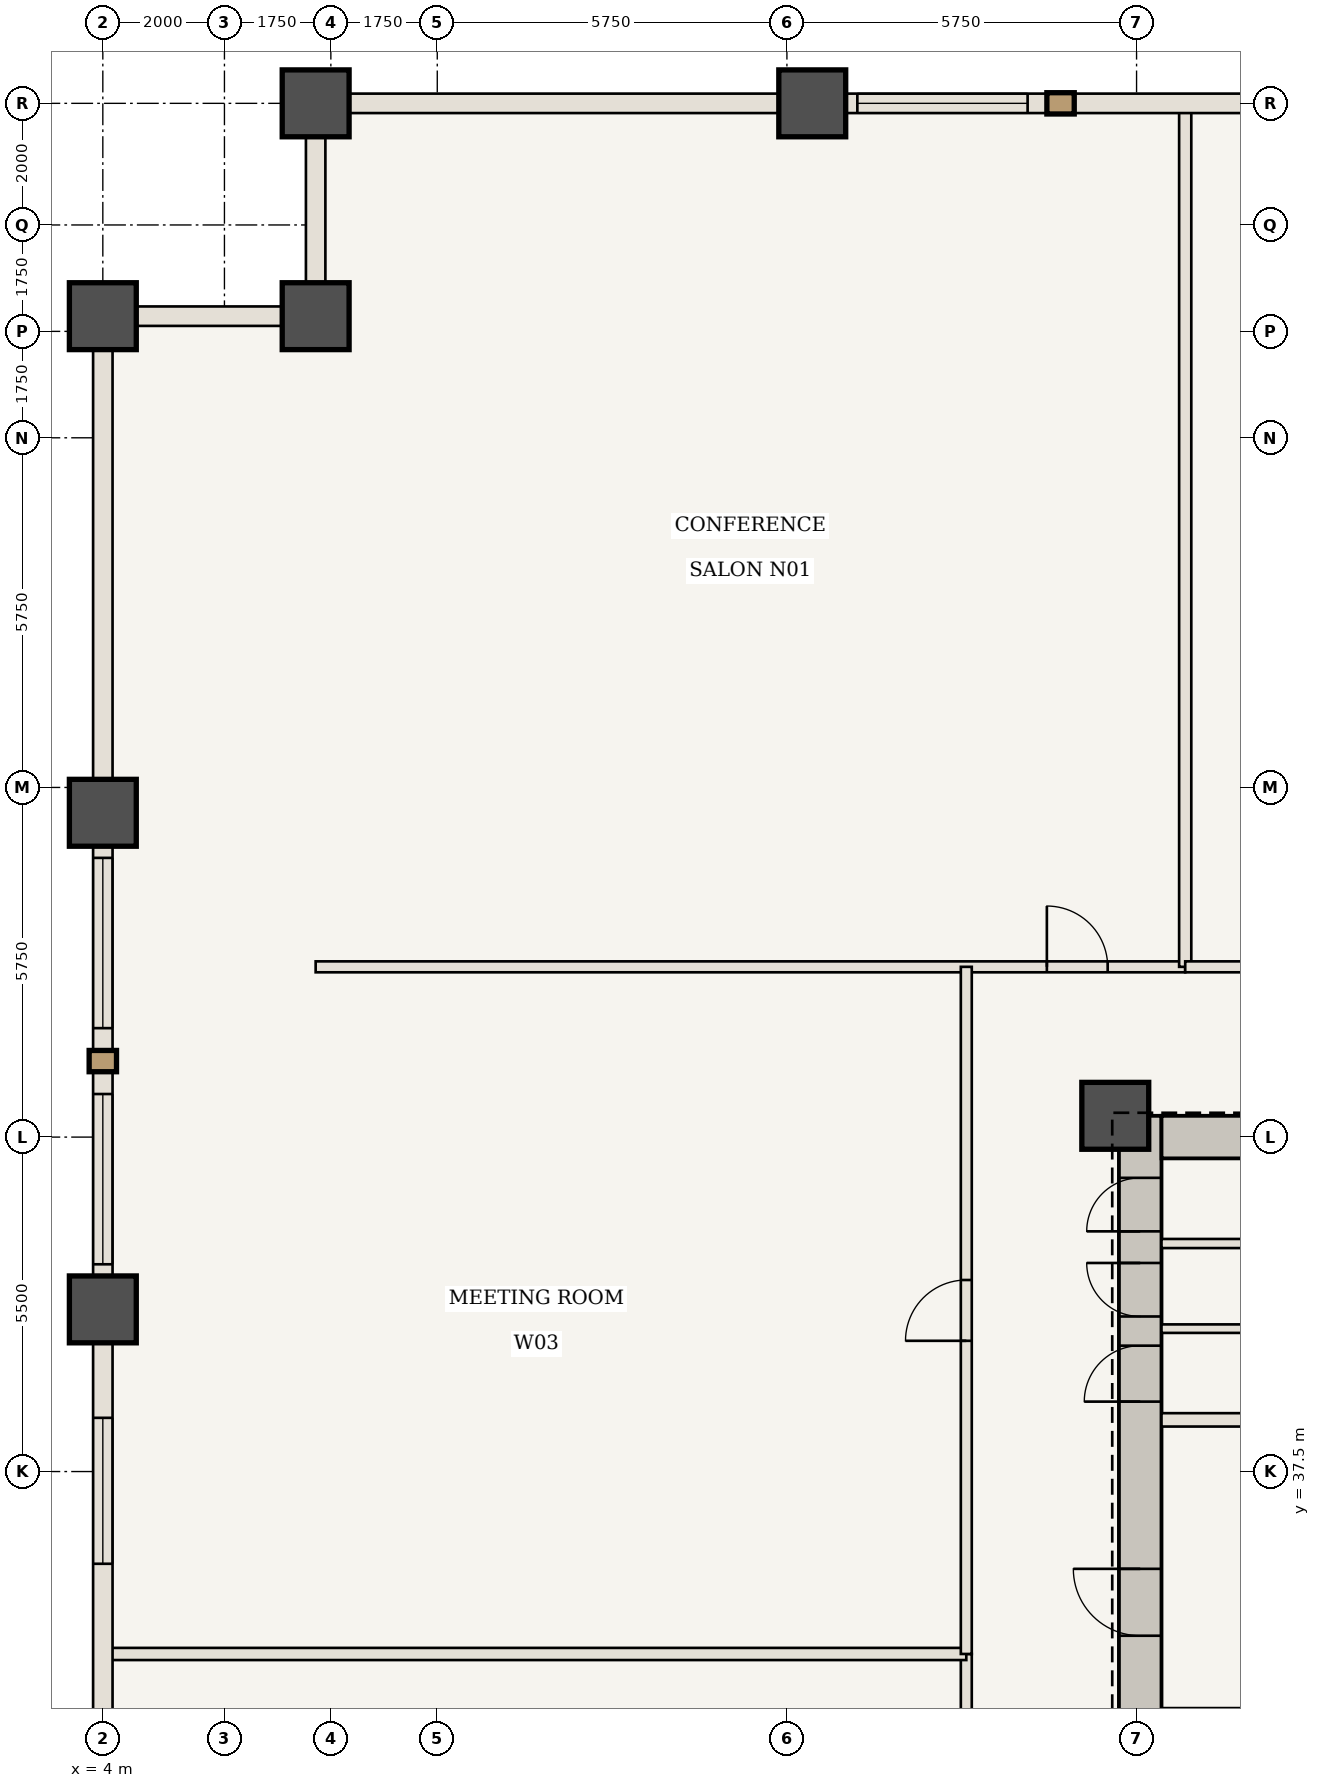
"""IFC4 building model, lengths in metres.
Left out: names, types, materials, properties, quantities, classifications, styles, units other than length and angle.
Written with IfcOpenShell. Run it as: python <this file> out.ifc"""

import sys

from ifc_helpers import new_model, si_unit, direction, frame, frame_2d, origin, origin_2d, place, context, subcontext, project, spatial, rectangle, extrude, element, fill, save


model = new_model("IFC4")
c1 = context("Model", 3, precision=1e-05, world=origin(), true_north=direction((0.0, 1.0)))
c2 = subcontext(c1, "Body", "Model", "MODEL_VIEW")
j1 = project(units=[si_unit("LENGTHUNIT", "METRE"), si_unit("PLANEANGLEUNIT", "RADIAN")], contexts=[c1])
p1 = place(None, origin())
s1 = spatial("IfcSite", under=j1, at=p1, CompositionType="ELEMENT")
p2 = place(p1, origin())
s2 = spatial("IfcBuilding", under=s1, at=p2, CompositionType="ELEMENT")
p3 = place(p2, frame((0.0, 0.0, 89.25)))
s3 = spatial("IfcBuildingStorey", under=s2, at=p3, CompositionType="ELEMENT", Elevation=89.25)
p4 = place(p3, frame((21.06, 30.6, 0.0), z_axis=(0.0, 0.0, 1.0), x_axis=(0.0, 1.0, 0.0)))
e1 = element("IfcWall", 1, at=p4, inside=s3, PredefinedType="SHEAR", context=c2, shape_type="SweptSolid", body=[
    extrude(rectangle(XDim=12.75, YDim=0.7, at=frame_2d((6.375, 0.0))), origin(), (0.0, 0.0, 1.0), 3.5),
])
p5 = place(p4, frame((4.2, 0.0, 0.0)))
e2 = element("IfcOpeningElement", 2, at=p5, cuts=e1, PredefinedType="OPENING", context=c2, shape_type="SweptSolid", body=[
    extrude(rectangle(XDim=1.1, YDim=2.15, at=frame_2d((0.55, 1.075))), frame((0.0, 0.36, 0.0), z_axis=(0.0, -1.0, 0.0), x_axis=(1.0, 0.0, 0.0)), (0.0, 0.0, 1.0), 0.72),
])
p6 = place(p4, frame((8.05, 0.0, 0.0)))
e3 = element("IfcOpeningElement", 3, at=p6, cuts=e1, PredefinedType="OPENING", context=c2, shape_type="SweptSolid", body=[
    extrude(rectangle(XDim=0.92, YDim=2.1, at=frame_2d((0.46, 1.05))), frame((0.0, 0.36, 0.0), z_axis=(0.0, -1.0, 0.0), x_axis=(1.0, 0.0, 0.0)), (0.0, 0.0, 1.0), 0.72),
])
p7 = place(p4, frame((9.45, 0.0, 0.0)))
e4 = element("IfcOpeningElement", 4, at=p7, cuts=e1, PredefinedType="OPENING", context=c2, shape_type="SweptSolid", body=[
    extrude(rectangle(XDim=0.88, YDim=2.1, at=frame_2d((0.44, 1.05))), frame((0.0, 0.36, 0.0), z_axis=(0.0, -1.0, 0.0), x_axis=(1.0, 0.0, 0.0)), (0.0, 0.0, 1.0), 0.72),
])
p8 = place(p4, frame((10.85, 0.0, 0.0)))
e5 = element("IfcOpeningElement", 5, at=p8, cuts=e1, PredefinedType="OPENING", context=c2, shape_type="SweptSolid", body=[
    extrude(rectangle(XDim=0.88, YDim=2.1, at=frame_2d((0.44, 1.05))), frame((0.0, 0.36, 0.0), z_axis=(0.0, -1.0, 0.0), x_axis=(1.0, 0.0, 0.0)), (0.0, 0.0, 1.0), 0.72),
])
p9 = place(p3, frame((21.41, 43.0, 0.0), z_axis=(0.0, 0.0, 1.0), x_axis=(1.0, 0.0, 0.0)))
e6 = element("IfcWall", 6, at=p9, inside=s3, PredefinedType="SHEAR", context=c2, shape_type="SweptSolid", body=[
    extrude(rectangle(XDim=8.24, YDim=0.7, at=frame_2d((4.12, 0.0))), origin(), (0.0, 0.0, 1.0), 3.5),
])
for number, where, z_axis, x_axis in (
    (7, (20.65, 43.35, 0.0), (0.0, 0.0, 1.0), (1.0, 0.0, 0.0)),
    (8, (7.5, 60.0, 0.0), (0.0, 0.0, 1.0), (1.0, 0.0, 0.0)),
    (9, (7.5, 56.5, 0.0), (0.0, 0.0, 1.0), (1.0, 0.0, 0.0)),
    (10, (4.0, 56.5, 0.0), (0.0, 0.0, 1.0), (1.0, 0.0, 0.0)),
    (11, (15.667, 60.0, 0.0), (0.0, 0.0, 1.0), (1.0, 0.0, 0.0)),
    (12, (4.0, 40.167, 0.0), (0.0, 0.0, 1.0), (1.0, 0.0, 0.0)),
    (13, (4.0, 48.333, 0.0), (0.0, 0.0, 1.0), (1.0, 0.0, 0.0)),
):
    element("IfcColumn", number, at=place(p3, frame(where, z_axis=z_axis, x_axis=x_axis)), inside=s3, PredefinedType="COLUMN", context=c2, shape_type="SweptSolid", body=[
        extrude(rectangle(XDim=1.1, YDim=1.1, at=origin_2d()), origin(), (0.0, 0.0, 1.0), 3.5),
    ])
p10 = place(p3, frame((21.41, 33.5, 0.0), z_axis=(0.0, 0.0, 1.0), x_axis=(1.0, 0.0, 0.0)))
e14 = element("IfcWall", 14, at=p10, inside=s3, PredefinedType="STANDARD", context=c2, shape_type="SweptSolid", body=[
    extrude(rectangle(XDim=3.53, YDim=0.22, at=frame_2d((1.765, 0.0))), origin(), (0.0, 0.0, 1.0), 3.32),
])
p11 = place(p10, frame((0.75, 0.0, 0.0)))
e15 = element("IfcOpeningElement", 15, at=p11, cuts=e14, PredefinedType="OPENING", context=c2, shape_type="SweptSolid", body=[
    extrude(rectangle(XDim=1.2, YDim=2.2, at=frame_2d((0.6, 1.1))), frame((0.0, 0.12, 0.0), z_axis=(0.0, -1.0, 0.0), x_axis=(1.0, 0.0, 0.0)), (0.0, 0.0, 1.0), 0.24),
])
p12 = place(p3, frame((21.41, 38.35, 0.0), z_axis=(0.0, 0.0, 1.0), x_axis=(1.0, 0.0, 0.0)))
e16 = element("IfcWall", 16, at=p12, inside=s3, PredefinedType="STANDARD", context=c2, shape_type="SweptSolid", body=[
    extrude(rectangle(XDim=3.53, YDim=0.22, at=frame_2d((1.765, 0.0))), origin(), (0.0, 0.0, 1.0), 3.32),
])
p13 = place(p3, frame((21.41, 39.85, 0.0), z_axis=(0.0, 0.0, 1.0), x_axis=(1.0, 0.0, 0.0)))
e17 = element("IfcWall", 17, at=p13, inside=s3, PredefinedType="STANDARD", context=c2, shape_type="SweptSolid", body=[
    extrude(rectangle(XDim=3.53, YDim=0.14, at=frame_2d((1.765, 0.0))), origin(), (0.0, 0.0, 1.0), 3.32),
])
p14 = place(p3, frame((21.41, 41.25, 0.0), z_axis=(0.0, 0.0, 1.0), x_axis=(1.0, 0.0, 0.0)))
e18 = element("IfcWall", 18, at=p14, inside=s3, PredefinedType="STANDARD", context=c2, shape_type="SweptSolid", body=[
    extrude(rectangle(XDim=3.53, YDim=0.15, at=frame_2d((1.765, 0.0))), origin(), (0.0, 0.0, 1.0), 3.32),
])
p15 = place(p3, frame((7.5, 45.8, 0.0), z_axis=(0.0, 0.0, 1.0), x_axis=(1.0, 0.0, 0.0)))
e19 = element("IfcWall", 19, at=p15, inside=s3, PredefinedType="STANDARD", context=c2, shape_type="SweptSolid", body=[
    extrude(rectangle(XDim=14.3, YDim=0.18, at=frame_2d((7.15, 0.0))), origin(), (0.0, 0.0, 1.0), 3.32),
])
p16 = place(p15, frame((12.025, 0.0, 0.0)))
e20 = element("IfcOpeningElement", 20, at=p16, cuts=e19, PredefinedType="OPENING", context=c2, shape_type="SweptSolid", body=[
    extrude(rectangle(XDim=1.0, YDim=2.15, at=frame_2d((0.5, 1.075))), frame((0.0, 0.1, 0.0), z_axis=(0.0, -1.0, 0.0), x_axis=(1.0, 0.0, 0.0)), (0.0, 0.0, 1.0), 0.2),
])
p17 = place(p3, frame((21.8, 45.8, 0.0), z_axis=(0.0, 0.0, 1.0), x_axis=(0.0, 1.0, 0.0)))
e21 = element("IfcWall", 21, at=p17, inside=s3, PredefinedType="STANDARD", context=c2, shape_type="SweptSolid", body=[
    extrude(rectangle(XDim=14.14, YDim=0.2, at=frame_2d((7.07, 0.0))), origin(), (0.0, 0.0, 1.0), 3.32),
])
p18 = place(p3, frame((21.8, 45.8, 0.0), z_axis=(0.0, 0.0, 1.0), x_axis=(1.0, 0.0, 0.0)))
e22 = element("IfcWall", 22, at=p18, inside=s3, PredefinedType="STANDARD", context=c2, shape_type="SweptSolid", body=[
    extrude(rectangle(XDim=16.7, YDim=0.18, at=frame_2d((8.35, 0.0))), origin(), (0.0, 0.0, 1.0), 3.32),
])
p19 = place(p18, frame((9.3, 0.0, 0.0)))
e23 = element("IfcOpeningElement", 23, at=p19, cuts=e22, PredefinedType="OPENING", context=c2, shape_type="SweptSolid", body=[
    extrude(rectangle(XDim=1.0, YDim=2.15, at=frame_2d((0.5, 1.075))), frame((0.0, 0.1, 0.0), z_axis=(0.0, -1.0, 0.0), x_axis=(1.0, 0.0, 0.0)), (0.0, 0.0, 1.0), 0.2),
])
p20 = place(p3, frame((18.2, 23.8, 0.0), z_axis=(0.0, 0.0, 1.0), x_axis=(0.0, 1.0, 0.0)))
e24 = element("IfcWall", 24, at=p20, inside=s3, PredefinedType="STANDARD", context=c2, shape_type="SweptSolid", body=[
    extrude(rectangle(XDim=10.7, YDim=0.18, at=frame_2d((5.35, 0.0))), origin(), (0.0, 0.0, 1.0), 3.32),
])
p21 = place(p20, frame((4.85, 0.0, 0.0)))
e25 = element("IfcOpeningElement", 25, at=p21, cuts=e24, PredefinedType="OPENING", context=c2, shape_type="SweptSolid", body=[
    extrude(rectangle(XDim=1.0, YDim=2.15, at=frame_2d((0.5, 1.075))), frame((0.0, 0.1, 0.0), z_axis=(0.0, -1.0, 0.0), x_axis=(1.0, 0.0, 0.0)), (0.0, 0.0, 1.0), 0.2),
])
p22 = place(p3, frame((4.06, 34.5, 0.0), z_axis=(0.0, 0.0, 1.0), x_axis=(1.0, 0.0, 0.0)))
e26 = element("IfcWall", 26, at=p22, inside=s3, PredefinedType="STANDARD", context=c2, shape_type="SweptSolid", body=[
    extrude(rectangle(XDim=14.14, YDim=0.2, at=frame_2d((7.07, 0.0))), origin(), (0.0, 0.0, 1.0), 3.32),
])
p23 = place(p3, frame((18.2, 34.5, 0.0), z_axis=(0.0, 0.0, 1.0), x_axis=(0.0, 1.0, 0.0)))
e27 = element("IfcWall", 27, at=p23, inside=s3, PredefinedType="STANDARD", context=c2, shape_type="SweptSolid", body=[
    extrude(rectangle(XDim=11.3, YDim=0.18, at=frame_2d((5.65, 0.0))), origin(), (0.0, 0.0, 1.0), 3.32),
])
p24 = place(p23, frame((5.15, 0.0, 0.0)))
e28 = element("IfcOpeningElement", 28, at=p24, cuts=e27, PredefinedType="OPENING", context=c2, shape_type="SweptSolid", body=[
    extrude(rectangle(XDim=1.0, YDim=2.15, at=frame_2d((0.5, 1.075))), frame((0.0, 0.1, 0.0), z_axis=(0.0, -1.0, 0.0), x_axis=(1.0, 0.0, 0.0)), (0.0, 0.0, 1.0), 0.2),
])
p25 = place(p3, frame((7.5, 60.0, 0.0), z_axis=(0.0, 0.0, 1.0), x_axis=(1.0, 0.0, 0.0)))
e29 = element("IfcWall", 29, at=p25, inside=s3, PredefinedType="USERDEFINED", context=c2, shape_type="SweptSolid", body=[
    extrude(rectangle(XDim=8.167, YDim=0.32, at=frame_2d((4.083, 0.0))), origin(), (0.0, 0.0, 1.0), 2.52),
])
p26 = place(p3, frame((15.667, 60.0, 0.0), z_axis=(0.0, 0.0, 1.0), x_axis=(1.0, 0.0, 0.0)))
e30 = element("IfcWall", 30, at=p26, inside=s3, PredefinedType="USERDEFINED", context=c2, shape_type="SweptSolid", body=[
    extrude(rectangle(XDim=8.167, YDim=0.32, at=frame_2d((4.083, 0.0))), origin(), (0.0, 0.0, 1.0), 2.52),
])
p27 = place(p26, frame((0.742, 0.0, 0.85)))
e31 = element("IfcOpeningElement", 31, at=p27, cuts=e30, PredefinedType="OPENING", context=c2, shape_type="SweptSolid", body=[
    extrude(rectangle(XDim=2.8, YDim=1.47, at=frame_2d((1.4, 0.735))), frame((0.0, 0.17, 0.0), z_axis=(0.0, -1.0, 0.0), x_axis=(1.0, 0.0, 0.0)), (0.0, 0.0, 1.0), 0.34),
])
p28 = place(p3, frame((4.0, 32.0, 0.0), z_axis=(0.0, 0.0, 1.0), x_axis=(0.0, 1.0, 0.0)))
e32 = element("IfcWall", 32, at=p28, inside=s3, PredefinedType="USERDEFINED", context=c2, shape_type="SweptSolid", body=[
    extrude(rectangle(XDim=8.167, YDim=0.32, at=frame_2d((4.083, 0.0))), origin(), (0.0, 0.0, 1.0), 2.52),
])
p29 = place(p28, frame((3.983, 0.0, 0.85)))
e33 = element("IfcOpeningElement", 33, at=p29, cuts=e32, PredefinedType="OPENING", context=c2, shape_type="SweptSolid", body=[
    extrude(rectangle(XDim=2.4, YDim=1.47, at=frame_2d((1.2, 0.735))), frame((0.0, 0.17, 0.0), z_axis=(0.0, -1.0, 0.0), x_axis=(1.0, 0.0, 0.0)), (0.0, 0.0, 1.0), 0.34),
])
p30 = place(p3, frame((4.0, 40.167, 0.0), z_axis=(0.0, 0.0, 1.0), x_axis=(0.0, 1.0, 0.0)))
e34 = element("IfcWall", 34, at=p30, inside=s3, PredefinedType="USERDEFINED", context=c2, shape_type="SweptSolid", body=[
    extrude(rectangle(XDim=8.167, YDim=0.32, at=frame_2d((4.083, 0.0))), origin(), (0.0, 0.0, 1.0), 2.52),
])
p31 = place(p30, frame((0.742, 0.0, 0.85)))
e35 = element("IfcOpeningElement", 35, at=p31, cuts=e34, PredefinedType="OPENING", context=c2, shape_type="SweptSolid", body=[
    extrude(rectangle(XDim=2.8, YDim=1.47, at=frame_2d((1.4, 0.735))), frame((0.0, 0.17, 0.0), z_axis=(0.0, -1.0, 0.0), x_axis=(1.0, 0.0, 0.0)), (0.0, 0.0, 1.0), 0.34),
])
p32 = place(p30, frame((4.625, 0.0, 0.85)))
e36 = element("IfcOpeningElement", 36, at=p32, cuts=e34, PredefinedType="OPENING", context=c2, shape_type="SweptSolid", body=[
    extrude(rectangle(XDim=2.8, YDim=1.47, at=frame_2d((1.4, 0.735))), frame((0.0, 0.17, 0.0), z_axis=(0.0, -1.0, 0.0), x_axis=(1.0, 0.0, 0.0)), (0.0, 0.0, 1.0), 0.34),
])
p33 = place(p3, frame((4.0, 48.333, 0.0), z_axis=(0.0, 0.0, 1.0), x_axis=(0.0, 1.0, 0.0)))
e37 = element("IfcWall", 37, at=p33, inside=s3, PredefinedType="USERDEFINED", context=c2, shape_type="SweptSolid", body=[
    extrude(rectangle(XDim=8.167, YDim=0.32, at=frame_2d((4.083, 0.0))), origin(), (0.0, 0.0, 1.0), 2.52),
])
for number, where, z_axis, x_axis in (
    (38, (7.5, 56.5, 0.0), (0.0, 0.0, 1.0), (0.0, 1.0, 0.0)),
    (39, (4.0, 56.5, 0.0), (0.0, 0.0, 1.0), (1.0, 0.0, 0.0)),
):
    element("IfcWall", number, at=place(p3, frame(where, z_axis=z_axis, x_axis=x_axis)), inside=s3, PredefinedType="USERDEFINED", context=c2, shape_type="SweptSolid", body=[
        extrude(rectangle(XDim=3.5, YDim=0.32, at=frame_2d((1.75, 0.0))), origin(), (0.0, 0.0, 1.0), 2.52),
    ])
p34 = place(p5, origin())
e40 = element("IfcDoor", 40, at=p34, inside=s3, OperationType="SINGLE_SWING_RIGHT", PredefinedType="DOOR", context=c2, shape_type="SweptSolid", body=[
    extrude(rectangle(XDim=1.1, YDim=2.15, at=frame_2d((0.55, 1.075))), frame((0.0, 0.025, 0.0), z_axis=(0.0, -1.0, 0.0), x_axis=(1.0, 0.0, 0.0)), (0.0, 0.0, 1.0), 0.05),
])
fill(e2, e40)
p35 = place(p6, origin())
e41 = element("IfcDoor", 41, at=p35, inside=s3, OperationType="SINGLE_SWING_LEFT", PredefinedType="DOOR", context=c2, shape_type="SweptSolid", body=[
    extrude(rectangle(XDim=0.92, YDim=2.1, at=frame_2d((0.46, 1.05))), frame((0.0, 0.025, 0.0), z_axis=(0.0, -1.0, 0.0), x_axis=(1.0, 0.0, 0.0)), (0.0, 0.0, 1.0), 0.05),
])
fill(e3, e41)
p36 = place(p7, origin())
e42 = element("IfcDoor", 42, at=p36, inside=s3, OperationType="SINGLE_SWING_RIGHT", PredefinedType="DOOR", context=c2, shape_type="SweptSolid", body=[
    extrude(rectangle(XDim=0.88, YDim=2.1, at=frame_2d((0.44, 1.05))), frame((0.0, 0.025, 0.0), z_axis=(0.0, -1.0, 0.0), x_axis=(1.0, 0.0, 0.0)), (0.0, 0.0, 1.0), 0.05),
])
fill(e4, e42)
p37 = place(p8, origin())
e43 = element("IfcDoor", 43, at=p37, inside=s3, OperationType="SINGLE_SWING_LEFT", PredefinedType="DOOR", context=c2, shape_type="SweptSolid", body=[
    extrude(rectangle(XDim=0.88, YDim=2.1, at=frame_2d((0.44, 1.05))), frame((0.0, 0.025, 0.0), z_axis=(0.0, -1.0, 0.0), x_axis=(1.0, 0.0, 0.0)), (0.0, 0.0, 1.0), 0.05),
])
fill(e5, e43)
p38 = place(p16, origin())
e44 = element("IfcDoor", 44, at=p38, inside=s3, OperationType="SINGLE_SWING_LEFT", PredefinedType="DOOR", context=c2, shape_type="SweptSolid", body=[
    extrude(rectangle(XDim=1.0, YDim=2.15, at=frame_2d((0.5, 1.075))), frame((0.0, 0.025, 0.0), z_axis=(0.0, -1.0, 0.0), x_axis=(1.0, 0.0, 0.0)), (0.0, 0.0, 1.0), 0.05),
])
fill(e20, e44)
p39 = place(p24, origin())
e45 = element("IfcDoor", 45, at=p39, inside=s3, OperationType="SINGLE_SWING_LEFT", PredefinedType="DOOR", context=c2, shape_type="SweptSolid", body=[
    extrude(rectangle(XDim=1.0, YDim=2.15, at=frame_2d((0.5, 1.075))), frame((0.0, 0.025, 0.0), z_axis=(0.0, -1.0, 0.0), x_axis=(1.0, 0.0, 0.0)), (0.0, 0.0, 1.0), 0.05),
])
fill(e28, e45)
p40 = place(p27, origin())
e46 = element("IfcWindow", 46, at=p40, inside=s3, PartitioningType="SINGLE_PANEL", PredefinedType="WINDOW", context=c2, shape_type="SweptSolid", body=[
    extrude(rectangle(XDim=2.8, YDim=1.47, at=frame_2d((1.4, 0.735))), frame((0.0, 0.03, 0.0), z_axis=(0.0, -1.0, 0.0), x_axis=(1.0, 0.0, 0.0)), (0.0, 0.0, 1.0), 0.06),
])
fill(e31, e46)
p41 = place(p29, origin())
e47 = element("IfcWindow", 47, at=p41, inside=s3, PartitioningType="SINGLE_PANEL", PredefinedType="WINDOW", context=c2, shape_type="SweptSolid", body=[
    extrude(rectangle(XDim=2.4, YDim=1.47, at=frame_2d((1.2, 0.735))), frame((0.0, 0.03, 0.0), z_axis=(0.0, -1.0, 0.0), x_axis=(1.0, 0.0, 0.0)), (0.0, 0.0, 1.0), 0.06),
])
fill(e33, e47)
p42 = place(p31, origin())
e48 = element("IfcWindow", 48, at=p42, inside=s3, PartitioningType="SINGLE_PANEL", PredefinedType="WINDOW", context=c2, shape_type="SweptSolid", body=[
    extrude(rectangle(XDim=2.8, YDim=1.47, at=frame_2d((1.4, 0.735))), frame((0.0, 0.03, 0.0), z_axis=(0.0, -1.0, 0.0), x_axis=(1.0, 0.0, 0.0)), (0.0, 0.0, 1.0), 0.06),
])
fill(e35, e48)
p43 = place(p32, origin())
e49 = element("IfcWindow", 49, at=p43, inside=s3, PartitioningType="SINGLE_PANEL", PredefinedType="WINDOW", context=c2, shape_type="SweptSolid", body=[
    extrude(rectangle(XDim=2.8, YDim=1.47, at=frame_2d((1.4, 0.735))), frame((0.0, 0.03, 0.0), z_axis=(0.0, -1.0, 0.0), x_axis=(1.0, 0.0, 0.0)), (0.0, 0.0, 1.0), 0.06),
])
fill(e36, e49)
save(model, sys.argv[1])
